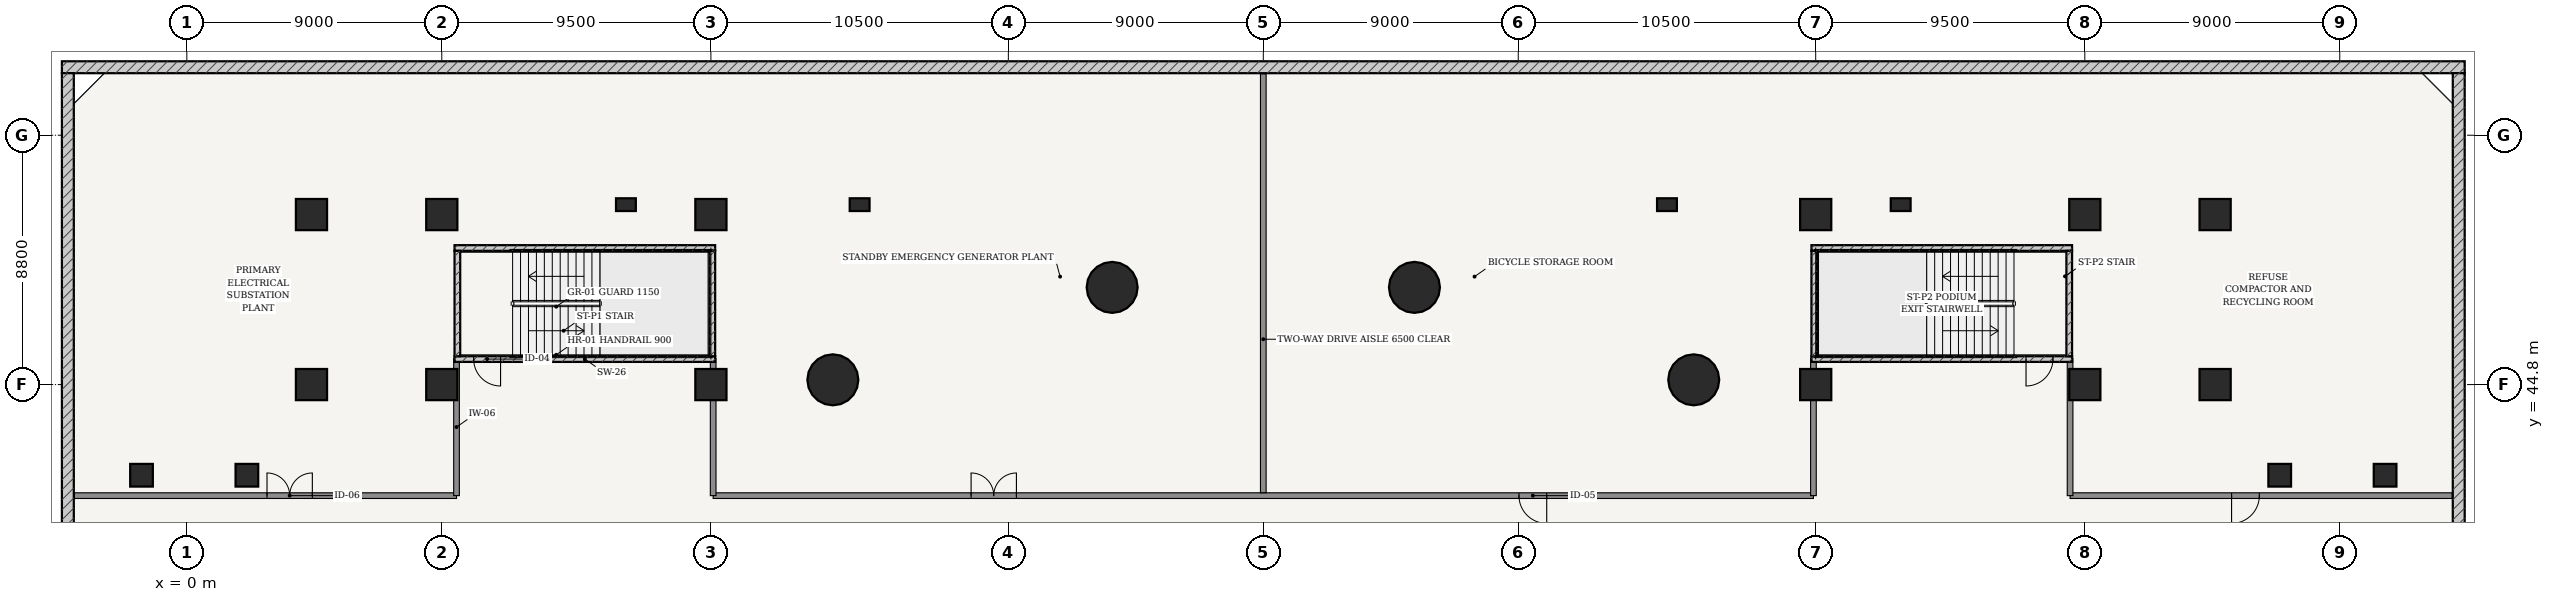
"""IFC4 building model, lengths in metres.
Left out: names, types, materials, properties, quantities, classifications, styles, units other than length and angle.
Written with IfcOpenShell. Run it as: python <this file> out.ifc"""

import sys

from ifc_helpers import new_model, si_unit, direction, frame, frame_2d, origin, origin_2d, place, context, subcontext, project, spatial, rectangle, hollow_circle, extrude, source, transform, mapped, element, fill, save


model = new_model("IFC4")
c1 = context("Model", 3, precision=1e-05, world=origin(), true_north=direction((-0.2419218956, 0.970295726276)))
c2 = subcontext(c1, "Body", "Model", "MODEL_VIEW")
j1 = project(units=[si_unit("LENGTHUNIT", "METRE"), si_unit("PLANEANGLEUNIT", "RADIAN")], contexts=[c1])
p1 = place(None, origin())
s1 = spatial("IfcSite", under=j1, at=p1, CompositionType="ELEMENT")
p2 = place(p1, origin())
s2 = spatial("IfcBuilding", under=s1, at=p2, CompositionType="ELEMENT")
p3 = place(p2, frame((0.0, 0.0, -4.2)))
s3 = spatial("IfcBuildingStorey", under=s2, at=p3, CompositionType="ELEMENT", Elevation=-4.2)
p4 = place(p3, frame((9.45, 45.7, 0.0), z_axis=(0.0, 0.0, 1.0), x_axis=(1.0, 0.0, 0.0)))
e1 = element("IfcWall", 1, at=p4, inside=s3, PredefinedType="SOLIDWALL", context=c2, shape_type="SweptSolid", body=[
    extrude(rectangle(XDim=9.2, YDim=0.2, at=frame_2d((4.6, 0.0))), origin(), (0.0, 0.0, 1.0), 3.78),
])
p5 = place(p4, frame((0.675, 0.0, 0.0)))
e2 = element("IfcOpeningElement", 2, at=p5, cuts=e1, PredefinedType="OPENING", context=c2, shape_type="SweptSolid", body=[
    extrude(rectangle(XDim=0.95, YDim=2.15, at=frame_2d((0.475, 1.075))), frame((0.0, 0.11, 0.0), z_axis=(0.0, -1.0, 0.0), x_axis=(1.0, 0.0, 0.0)), (0.0, 0.0, 1.0), 0.22),
])
p6 = place(p3, frame((9.45, 49.62, 0.0), z_axis=(0.0, 0.0, 1.0), x_axis=(1.0, 0.0, 0.0)))
e3 = element("IfcWall", 3, at=p6, inside=s3, PredefinedType="SOLIDWALL", context=c2, shape_type="SweptSolid", body=[
    extrude(rectangle(XDim=9.2, YDim=0.2, at=frame_2d((4.6, 0.0))), origin(), (0.0, 0.0, 1.0), 3.78),
])
for number, where, z_axis, x_axis in (
    (4, (9.55, 45.8, 0.0), (0.0, 0.0, 1.0), (0.0, 1.0, 0.0)),
    (5, (18.55, 45.8, 0.0), (0.0, 0.0, 1.0), (0.0, 1.0, 0.0)),
):
    element("IfcWall", number, at=place(p3, frame(where, z_axis=z_axis, x_axis=x_axis)), inside=s3, PredefinedType="SOLIDWALL", context=c2, shape_type="SweptSolid", body=[
        extrude(rectangle(XDim=3.72, YDim=0.2, at=frame_2d((1.86, 0.0))), origin(), (0.0, 0.0, 1.0), 3.78),
    ])
p7 = place(p3, frame((57.35, 45.7, 0.0), z_axis=(0.0, 0.0, 1.0), x_axis=(1.0, 0.0, 0.0)))
e6 = element("IfcWall", 6, at=p7, inside=s3, PredefinedType="SOLIDWALL", context=c2, shape_type="SweptSolid", body=[
    extrude(rectangle(XDim=9.2, YDim=0.2, at=frame_2d((4.6, 0.0))), origin(), (0.0, 0.0, 1.0), 3.78),
])
p8 = place(p7, frame((7.575, 0.0, 0.0)))
e7 = element("IfcOpeningElement", 7, at=p8, cuts=e6, PredefinedType="OPENING", context=c2, shape_type="SweptSolid", body=[
    extrude(rectangle(XDim=0.95, YDim=2.15, at=frame_2d((0.475, 1.075))), frame((0.0, 0.11, 0.0), z_axis=(0.0, -1.0, 0.0), x_axis=(1.0, 0.0, 0.0)), (0.0, 0.0, 1.0), 0.22),
])
p9 = place(p3, frame((57.35, 49.62, 0.0), z_axis=(0.0, 0.0, 1.0), x_axis=(1.0, 0.0, 0.0)))
e8 = element("IfcWall", 8, at=p9, inside=s3, PredefinedType="SOLIDWALL", context=c2, shape_type="SweptSolid", body=[
    extrude(rectangle(XDim=9.2, YDim=0.2, at=frame_2d((4.6, 0.0))), origin(), (0.0, 0.0, 1.0), 3.78),
])
for number, where, z_axis, x_axis in (
    (9, (57.45, 45.8, 0.0), (0.0, 0.0, 1.0), (0.0, 1.0, 0.0)),
    (10, (66.45, 45.8, 0.0), (0.0, 0.0, 1.0), (0.0, 1.0, 0.0)),
):
    element("IfcWall", number, at=place(p3, frame(where, z_axis=z_axis, x_axis=x_axis)), inside=s3, PredefinedType="SOLIDWALL", context=c2, shape_type="SweptSolid", body=[
        extrude(rectangle(XDim=3.72, YDim=0.2, at=frame_2d((1.86, 0.0))), origin(), (0.0, 0.0, 1.0), 3.78),
    ])
p10 = place(p3, frame((-4.41, 56.0, 0.0), z_axis=(0.0, 0.0, 1.0), x_axis=(1.0, 0.0, 0.0)))
e11 = element("IfcWall", 11, at=p10, inside=s3, PredefinedType="SOLIDWALL", context=c2, shape_type="SweptSolid", body=[
    extrude(rectangle(XDim=84.82, YDim=0.42, at=frame_2d((42.41, 0.0))), origin(), (0.0, 0.0, 1.0), 3.78),
])
for number, where, z_axis, x_axis in (
    (12, (-4.2, -2.19, 0.0), (0.0, 0.0, 1.0), (0.0, 1.0, 0.0)),
    (13, (80.2, -2.19, 0.0), (0.0, 0.0, 1.0), (0.0, 1.0, 0.0)),
):
    element("IfcWall", number, at=place(p3, frame(where, z_axis=z_axis, x_axis=x_axis)), inside=s3, PredefinedType="SOLIDWALL", context=c2, shape_type="SweptSolid", body=[
        extrude(rectangle(XDim=57.98, YDim=0.42, at=frame_2d((28.99, 0.0))), origin(), (0.0, 0.0, 1.0), 3.78),
    ])
for number, where, z_axis, x_axis in (
    (14, (53.195, 44.968, 0.0), (0.0, 0.0, 1.0), (1.0, 0.0, 0.0)),
    (15, (43.336, 48.23, 0.0), (0.0, 0.0, 1.0), (1.0, 0.0, 0.0)),
    (16, (32.664, 48.23, 0.0), (0.0, 0.0, 1.0), (1.0, 0.0, 0.0)),
    (17, (22.805, 44.968, 0.0), (0.0, 0.0, 1.0), (1.0, 0.0, 0.0)),
):
    element("IfcColumn", number, at=place(p3, frame(where, z_axis=z_axis, x_axis=x_axis)), inside=s3, PredefinedType="COLUMN", context=c2, shape_type="SweptSolid", body=[
        extrude(hollow_circle(Radius=0.9, WallThickness=0.055, at=origin_2d()), origin(), (0.0, 0.0, 1.0), 4.2),
    ])
for number, where, z_axis, x_axis in (
    (18, (4.4, 44.8, 0.0), (0.0, 0.0, 1.0), (1.0, 0.0, 0.0)),
    (19, (4.4, 50.8, 0.0), (0.0, 0.0, 1.0), (1.0, 0.0, 0.0)),
    (20, (9.0, 44.8, 0.0), (0.0, 0.0, 1.0), (1.0, 0.0, 0.0)),
    (21, (9.0, 50.8, 0.0), (0.0, 0.0, 1.0), (1.0, 0.0, 0.0)),
    (22, (18.5, 44.8, 0.0), (0.0, 0.0, 1.0), (1.0, 0.0, 0.0)),
    (23, (18.5, 50.8, 0.0), (0.0, 0.0, 1.0), (1.0, 0.0, 0.0)),
    (24, (57.5, 44.8, 0.0), (0.0, 0.0, 1.0), (1.0, 0.0, 0.0)),
    (25, (57.5, 50.8, 0.0), (0.0, 0.0, 1.0), (1.0, 0.0, 0.0)),
    (26, (67.0, 44.8, 0.0), (0.0, 0.0, 1.0), (1.0, 0.0, 0.0)),
    (27, (67.0, 50.8, 0.0), (0.0, 0.0, 1.0), (1.0, 0.0, 0.0)),
    (28, (71.6, 44.8, 0.0), (0.0, 0.0, 1.0), (1.0, 0.0, 0.0)),
    (29, (71.6, 50.8, 0.0), (0.0, 0.0, 1.0), (1.0, 0.0, 0.0)),
):
    element("IfcColumn", number, at=place(p3, frame(where, z_axis=z_axis, x_axis=x_axis)), inside=s3, PredefinedType="COLUMN", context=c2, shape_type="SweptSolid", body=[
        extrude(rectangle(XDim=1.1, YDim=1.1, at=origin_2d()), origin(), (0.0, 0.0, 1.0), 4.2),
    ])
for number, where, z_axis, x_axis in (
    (30, (15.5, 51.15, 0.0), (0.0, 0.0, 1.0), (1.0, 0.0, 0.0)),
    (31, (23.75, 51.15, 0.0), (0.0, 0.0, 1.0), (1.0, 0.0, 0.0)),
    (32, (52.25, 51.15, 0.0), (0.0, 0.0, 1.0), (1.0, 0.0, 0.0)),
    (33, (60.5, 51.15, 0.0), (0.0, 0.0, 1.0), (1.0, 0.0, 0.0)),
):
    element("IfcColumn", number, at=place(p3, frame(where, z_axis=z_axis, x_axis=x_axis)), inside=s3, PredefinedType="PILASTER", context=c2, shape_type="SweptSolid", body=[
        extrude(rectangle(XDim=0.7, YDim=0.45, at=origin_2d()), origin(), (0.0, 0.0, 1.0), 4.2),
    ])
for number, where, z_axis, x_axis in (
    (34, (-1.6, 41.6, 0.0), (0.0, 0.0, 1.0), (1.0, 0.0, 0.0)),
    (35, (2.12, 41.6, 0.0), (0.0, 0.0, 1.0), (1.0, 0.0, 0.0)),
    (36, (73.88, 41.6, 0.0), (0.0, 0.0, 1.0), (1.0, 0.0, 0.0)),
    (37, (77.6, 41.6, 0.0), (0.0, 0.0, 1.0), (1.0, 0.0, 0.0)),
):
    element("IfcColumn", number, at=place(p3, frame(where, z_axis=z_axis, x_axis=x_axis)), inside=s3, PredefinedType="COLUMN", context=c2, shape_type="SweptSolid", body=[
        extrude(rectangle(XDim=0.8, YDim=0.8, at=origin_2d()), origin(), (0.0, 0.0, 1.0), 4.2),
    ])
p11 = place(p3, frame((-3.97, 40.88, 0.0), z_axis=(0.0, 0.0, 1.0), x_axis=(1.0, 0.0, 0.0)))
e38 = element("IfcWall", 38, at=p11, inside=s3, PredefinedType="PARTITIONING", context=c2, shape_type="SweptSolid", body=[
    extrude(rectangle(XDim=13.49, YDim=0.2, at=frame_2d((6.745, 0.0))), origin(), (0.0, 0.0, 1.0), 2.815),
])
p12 = place(p11, frame((6.8, 0.0, 0.0)))
e39 = element("IfcOpeningElement", 39, at=p12, cuts=e38, PredefinedType="OPENING", context=c2, shape_type="SweptSolid", body=[
    extrude(rectangle(XDim=1.6, YDim=2.25, at=frame_2d((0.8, 1.125))), frame((0.0, 0.11, 0.0), z_axis=(0.0, -1.0, 0.0), x_axis=(1.0, 0.0, 0.0)), (0.0, 0.0, 1.0), 0.22),
])
p13 = place(p3, frame((9.52, 40.88, 0.0), z_axis=(0.0, 0.0, 1.0), x_axis=(0.0, 1.0, 0.0)))
e40 = element("IfcWall", 40, at=p13, inside=s3, PredefinedType="PARTITIONING", context=c2, shape_type="SweptSolid", body=[
    extrude(rectangle(XDim=4.84, YDim=0.2, at=frame_2d((2.42, 0.0))), origin(), (0.0, 0.0, 1.0), 2.915),
])
p14 = place(p3, frame((18.58, 40.88, 0.0), z_axis=(0.0, 0.0, 1.0), x_axis=(1.0, 0.0, 0.0)))
e41 = element("IfcWall", 41, at=p14, inside=s3, PredefinedType="PARTITIONING", context=c2, shape_type="SweptSolid", body=[
    extrude(rectangle(XDim=38.84, YDim=0.2, at=frame_2d((19.42, 0.0))), origin(), (0.0, 0.0, 1.0), 3.13),
])
p15 = place(p14, frame((9.105, 0.0, 0.0)))
e42 = element("IfcOpeningElement", 42, at=p15, cuts=e41, PredefinedType="OPENING", context=c2, shape_type="SweptSolid", body=[
    extrude(rectangle(XDim=1.6, YDim=2.25, at=frame_2d((0.8, 1.125))), frame((0.0, 0.11, 0.0), z_axis=(0.0, -1.0, 0.0), x_axis=(1.0, 0.0, 0.0)), (0.0, 0.0, 1.0), 0.22),
])
p16 = place(p14, frame((28.445, 0.0, 0.0)))
e43 = element("IfcOpeningElement", 43, at=p16, cuts=e41, PredefinedType="OPENING", context=c2, shape_type="SweptSolid", body=[
    extrude(rectangle(XDim=0.98, YDim=2.2, at=frame_2d((0.49, 1.1))), frame((0.0, 0.11, 0.0), z_axis=(0.0, -1.0, 0.0), x_axis=(1.0, 0.0, 0.0)), (0.0, 0.0, 1.0), 0.22),
])
for number, where, z_axis, x_axis in (
    (44, (18.58, 40.88, 0.0), (0.0, 0.0, 1.0), (0.0, 1.0, 0.0)),
    (45, (57.42, 40.88, 0.0), (0.0, 0.0, 1.0), (0.0, 1.0, 0.0)),
):
    element("IfcWall", number, at=place(p3, frame(where, z_axis=z_axis, x_axis=x_axis)), inside=s3, PredefinedType="PARTITIONING", context=c2, shape_type="SweptSolid", body=[
        extrude(rectangle(XDim=4.84, YDim=0.2, at=frame_2d((2.42, 0.0))), origin(), (0.0, 0.0, 1.0), 2.915),
    ])
p17 = place(p3, frame((66.48, 40.88, 0.0), z_axis=(0.0, 0.0, 1.0), x_axis=(1.0, 0.0, 0.0)))
e46 = element("IfcWall", 46, at=p17, inside=s3, PredefinedType="PARTITIONING", context=c2, shape_type="SweptSolid", body=[
    extrude(rectangle(XDim=13.49, YDim=0.2, at=frame_2d((6.745, 0.0))), origin(), (0.0, 0.0, 1.0), 2.815),
])
p18 = place(p17, frame((5.701, 0.0, 0.0)))
e47 = element("IfcOpeningElement", 47, at=p18, cuts=e46, PredefinedType="OPENING", context=c2, shape_type="SweptSolid", body=[
    extrude(rectangle(XDim=0.98, YDim=2.2, at=frame_2d((0.49, 1.1))), frame((0.0, 0.11, 0.0), z_axis=(0.0, -1.0, 0.0), x_axis=(1.0, 0.0, 0.0)), (0.0, 0.0, 1.0), 0.22),
])
p19 = place(p3, frame((66.48, 40.88, 0.0), z_axis=(0.0, 0.0, 1.0), x_axis=(0.0, 1.0, 0.0)))
e48 = element("IfcWall", 48, at=p19, inside=s3, PredefinedType="PARTITIONING", context=c2, shape_type="SweptSolid", body=[
    extrude(rectangle(XDim=4.84, YDim=0.2, at=frame_2d((2.42, 0.0))), origin(), (0.0, 0.0, 1.0), 2.915),
])
p20 = place(p3, frame((38.0, 40.982, 0.0), z_axis=(0.0, 0.0, 1.0), x_axis=(0.0, 1.0, 0.0)))
e49 = element("IfcWall", 49, at=p20, inside=s3, PredefinedType="PARTITIONING", context=c2, shape_type="SweptSolid", body=[
    extrude(rectangle(XDim=14.788, YDim=0.2, at=frame_2d((7.394, 0.0))), origin(), (0.0, 0.0, 1.0), 3.222),
])
m1 = source(origin(), c2, "Body", "SweptSolid", [
    extrude(rectangle(XDim=0.95, YDim=2.15, at=frame_2d((0.475, 1.075))), frame((0.0, 0.025, 0.0), z_axis=(0.0, -1.0, 0.0), x_axis=(1.0, 0.0, 0.0)), (0.0, 0.0, 1.0), 0.05),
])
p21 = place(p5, frame((0.95, 0.0, 0.0), z_axis=(0.0, 0.0, 1.0), x_axis=(-1.0, 0.0, 0.0)))
e50 = element("IfcDoor", 50, at=p21, inside=s3, OperationType="SINGLE_SWING_LEFT", PredefinedType="DOOR", context=c2, shape_type="MappedRepresentation", body=[
    mapped(m1, transform((0.0, 0.0, 0.0), scale=1.0)),
])
fill(e2, e50)
p22 = place(p8, frame((0.95, 0.0, 0.0), z_axis=(0.0, 0.0, 1.0), x_axis=(-1.0, 0.0, 0.0)))
e51 = element("IfcDoor", 51, at=p22, inside=s3, OperationType="SINGLE_SWING_RIGHT", PredefinedType="DOOR", context=c2, shape_type="MappedRepresentation", body=[
    mapped(m1, transform((0.0, 0.0, 0.0), scale=1.0)),
])
fill(e7, e51)
m2 = source(origin(), c2, "Body", "SweptSolid", [
    extrude(rectangle(XDim=1.6, YDim=2.25, at=frame_2d((0.8, 1.125))), frame((0.0, 0.025, 0.0), z_axis=(0.0, -1.0, 0.0), x_axis=(1.0, 0.0, 0.0)), (0.0, 0.0, 1.0), 0.05),
])
p23 = place(p12, origin())
e52 = element("IfcDoor", 52, at=p23, inside=s3, OperationType="DOUBLE_DOOR_SINGLE_SWING", PredefinedType="DOOR", context=c2, shape_type="MappedRepresentation", body=[
    mapped(m2, transform((0.0, 0.0, 0.0), scale=1.0)),
])
fill(e39, e52)
p24 = place(p15, origin())
e53 = element("IfcDoor", 53, at=p24, inside=s3, OperationType="DOUBLE_DOOR_SINGLE_SWING", PredefinedType="DOOR", context=c2, shape_type="MappedRepresentation", body=[
    mapped(m2, transform((0.0, 0.0, 0.0), scale=1.0)),
])
fill(e42, e53)
m3 = source(origin(), c2, "Body", "SweptSolid", [
    extrude(rectangle(XDim=0.98, YDim=2.2, at=frame_2d((0.49, 1.1))), frame((0.0, 0.025, 0.0), z_axis=(0.0, -1.0, 0.0), x_axis=(1.0, 0.0, 0.0)), (0.0, 0.0, 1.0), 0.05),
])
p25 = place(p16, frame((0.98, 0.0, 0.0), z_axis=(0.0, 0.0, 1.0), x_axis=(-1.0, 0.0, 0.0)))
e54 = element("IfcDoor", 54, at=p25, inside=s3, OperationType="SINGLE_SWING_LEFT", PredefinedType="DOOR", context=c2, shape_type="MappedRepresentation", body=[
    mapped(m3, transform((0.0, 0.0, 0.0), scale=1.0)),
])
fill(e43, e54)
p26 = place(p18, frame((0.98, 0.0, 0.0), z_axis=(0.0, 0.0, 1.0), x_axis=(-1.0, 0.0, 0.0)))
e55 = element("IfcDoor", 55, at=p26, inside=s3, OperationType="SINGLE_SWING_RIGHT", PredefinedType="DOOR", context=c2, shape_type="MappedRepresentation", body=[
    mapped(m3, transform((0.0, 0.0, 0.0), scale=1.0)),
])
fill(e47, e55)
save(model, sys.argv[1])
